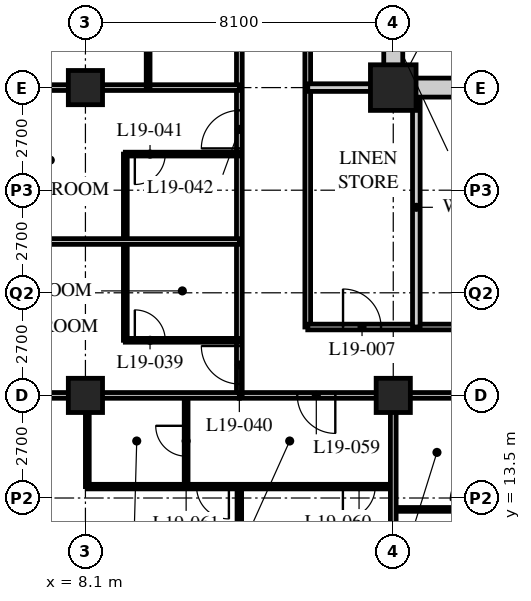
"""IFC4 building model, lengths in metres.
Left out: names, types, materials, properties, quantities, classifications, styles, units other than length and angle.
Written with IfcOpenShell. Run it as: python <this file> out.ifc"""

import sys

from ifc_helpers import new_model, si_unit, direction, frame, frame_2d, origin, origin_2d, place, context, subcontext, project, spatial, rectangle, hollow_rectangle, extrude, element, fill, save


model = new_model("IFC4")
c1 = context("Model", 3, precision=1e-05, world=origin(), true_north=direction((0.0, 1.0)))
c2 = subcontext(c1, "Body", "Model", "MODEL_VIEW")
j1 = project(units=[si_unit("LENGTHUNIT", "METRE"), si_unit("PLANEANGLEUNIT", "RADIAN")], contexts=[c1])
p1 = place(None, origin())
s1 = spatial("IfcSite", under=j1, at=p1, CompositionType="ELEMENT")
p2 = place(p1, origin())
s2 = spatial("IfcBuilding", under=s1, at=p2, CompositionType="ELEMENT")
p3 = place(p2, frame((0.0, 0.0, 77.2)))
s3 = spatial("IfcBuildingStorey", under=s2, at=p3, CompositionType="ELEMENT", Elevation=77.2)
for number, where, z_axis, x_axis in (
    (1, (8.1, 16.2, 0.0), (0.0, 0.0, 1.0), (1.0, 0.0, 0.0)),
    (2, (8.1, 24.3, 0.0), (0.0, 0.0, 1.0), (1.0, 0.0, 0.0)),
    (3, (16.2, 16.2, 0.0), (0.0, 0.0, 1.0), (1.0, 0.0, 0.0)),
):
    element("IfcColumn", number, at=place(p3, frame(where, z_axis=z_axis, x_axis=x_axis)), inside=s3, PredefinedType="COLUMN", context=c2, shape_type="SweptSolid", body=[
        extrude(hollow_rectangle(XDim=0.9, YDim=0.9, WallThickness=0.09, at=origin_2d()), origin(), (0.0, 0.0, 1.0), 3.4),
    ])
p4 = place(p3, frame((16.2, 24.3, 0.0), z_axis=(0.0, 0.0, 1.0), x_axis=(1.0, 0.0, 0.0)))
e4 = element("IfcColumn", 4, at=p4, inside=s3, PredefinedType="COLUMN", context=c2, shape_type="SweptSolid", body=[
    extrude(hollow_rectangle(XDim=1.2, YDim=1.2, WallThickness=0.12, at=origin_2d()), origin(), (0.0, 0.0, 1.0), 3.4),
])
p5 = place(p3, frame((12.15, 16.2, 0.0), z_axis=(0.0, 0.0, 1.0), x_axis=(1.0, 0.0, 0.0)))
e5 = element("IfcWall", 5, at=p5, inside=s3, PredefinedType="PARTITIONING", context=c2, shape_type="SweptSolid", body=[
    extrude(rectangle(XDim=36.45, YDim=0.15, at=frame_2d((18.225, 0.0))), origin(), (0.0, 0.0, 1.0), 2.428),
])
p6 = place(p5, frame((6.5, 0.0, 0.0)))
e6 = element("IfcOpeningElement", 6, at=p6, cuts=e5, PredefinedType="OPENING", context=c2, shape_type="SweptSolid", body=[
    extrude(rectangle(XDim=1.0, YDim=2.1, at=frame_2d((0.5, 1.05))), frame((0.0, 0.085, 0.0), z_axis=(0.0, -1.0, 0.0), x_axis=(1.0, 0.0, 0.0)), (0.0, 0.0, 1.0), 0.17),
])
p7 = place(p5, frame((8.4, 0.0, 0.0)))
e7 = element("IfcOpeningElement", 7, at=p7, cuts=e5, PredefinedType="OPENING", context=c2, shape_type="SweptSolid", body=[
    extrude(rectangle(XDim=1.0, YDim=2.1, at=frame_2d((0.5, 1.05))), frame((0.0, 0.085, 0.0), z_axis=(0.0, -1.0, 0.0), x_axis=(1.0, 0.0, 0.0)), (0.0, 0.0, 1.0), 0.17),
])
p8 = place(p5, frame((14.9, 0.0, 0.0)))
e8 = element("IfcOpeningElement", 8, at=p8, cuts=e5, PredefinedType="OPENING", context=c2, shape_type="SweptSolid", body=[
    extrude(rectangle(XDim=1.0, YDim=2.1, at=frame_2d((0.5, 1.05))), frame((0.0, 0.085, 0.0), z_axis=(0.0, -1.0, 0.0), x_axis=(1.0, 0.0, 0.0)), (0.0, 0.0, 1.0), 0.17),
])
p9 = place(p5, frame((16.5, 0.0, 0.0)))
e9 = element("IfcOpeningElement", 9, at=p9, cuts=e5, PredefinedType="OPENING", context=c2, shape_type="SweptSolid", body=[
    extrude(rectangle(XDim=1.0, YDim=2.1, at=frame_2d((0.5, 1.05))), frame((0.0, 0.085, 0.0), z_axis=(0.0, -1.0, 0.0), x_axis=(1.0, 0.0, 0.0)), (0.0, 0.0, 1.0), 0.17),
])
p10 = place(p5, frame((22.7, 0.0, 0.0)))
e10 = element("IfcOpeningElement", 10, at=p10, cuts=e5, PredefinedType="OPENING", context=c2, shape_type="SweptSolid", body=[
    extrude(rectangle(XDim=1.0, YDim=2.1, at=frame_2d((0.5, 1.05))), frame((0.0, 0.085, 0.0), z_axis=(0.0, -1.0, 0.0), x_axis=(1.0, 0.0, 0.0)), (0.0, 0.0, 1.0), 0.17),
])
p11 = place(p5, frame((24.9, 0.0, 0.0)))
e11 = element("IfcOpeningElement", 11, at=p11, cuts=e5, PredefinedType="OPENING", context=c2, shape_type="SweptSolid", body=[
    extrude(rectangle(XDim=1.0, YDim=2.1, at=frame_2d((0.5, 1.05))), frame((0.0, 0.085, 0.0), z_axis=(0.0, -1.0, 0.0), x_axis=(1.0, 0.0, 0.0)), (0.0, 0.0, 1.0), 0.17),
])
p12 = place(p5, frame((30.8, 0.0, 0.0)))
e12 = element("IfcOpeningElement", 12, at=p12, cuts=e5, PredefinedType="OPENING", context=c2, shape_type="SweptSolid", body=[
    extrude(rectangle(XDim=1.0, YDim=2.1, at=frame_2d((0.5, 1.05))), frame((0.0, 0.085, 0.0), z_axis=(0.0, -1.0, 0.0), x_axis=(1.0, 0.0, 0.0)), (0.0, 0.0, 1.0), 0.17),
])
p13 = place(p5, frame((1.525, 0.0, 0.0)))
e13 = element("IfcOpeningElement", 13, at=p13, cuts=e5, PredefinedType="OPENING", context=c2, shape_type="SweptSolid", body=[
    extrude(rectangle(XDim=1.0, YDim=2.1, at=frame_2d((0.5, 1.05))), frame((0.0, 0.085, 0.0), z_axis=(0.0, -1.0, 0.0), x_axis=(1.0, 0.0, 0.0)), (0.0, 0.0, 1.0), 0.17),
])
p14 = place(p5, frame((33.925, 0.0, 0.0)))
e14 = element("IfcOpeningElement", 14, at=p14, cuts=e5, PredefinedType="OPENING", context=c2, shape_type="SweptSolid", body=[
    extrude(rectangle(XDim=1.0, YDim=2.1, at=frame_2d((0.5, 1.05))), frame((0.0, 0.085, 0.0), z_axis=(0.0, -1.0, 0.0), x_axis=(1.0, 0.0, 0.0)), (0.0, 0.0, 1.0), 0.17),
])
p15 = place(p3, frame((12.15, 16.2, 0.0), z_axis=(0.0, 0.0, 1.0), x_axis=(0.0, 1.0, 0.0)))
e15 = element("IfcWall", 15, at=p15, inside=s3, PredefinedType="PARTITIONING", context=c2, shape_type="SweptSolid", body=[
    extrude(rectangle(XDim=26.1, YDim=0.15, at=frame_2d((13.05, 0.0))), origin(), (0.0, 0.0, 1.0), 3.19),
])
p16 = place(p15, frame((0.3, 0.0, 0.0)))
e16 = element("IfcOpeningElement", 16, at=p16, cuts=e15, PredefinedType="OPENING", context=c2, shape_type="SweptSolid", body=[
    extrude(rectangle(XDim=1.0, YDim=2.1, at=frame_2d((0.5, 1.05))), frame((0.0, 0.085, 0.0), z_axis=(0.0, -1.0, 0.0), x_axis=(1.0, 0.0, 0.0)), (0.0, 0.0, 1.0), 0.17),
])
p17 = place(p15, frame((6.5, 0.0, 0.0)))
e17 = element("IfcOpeningElement", 17, at=p17, cuts=e15, PredefinedType="OPENING", context=c2, shape_type="SweptSolid", body=[
    extrude(rectangle(XDim=1.0, YDim=2.1, at=frame_2d((0.5, 1.05))), frame((0.0, 0.085, 0.0), z_axis=(0.0, -1.0, 0.0), x_axis=(1.0, 0.0, 0.0)), (0.0, 0.0, 1.0), 0.17),
])
p18 = place(p15, frame((13.55, 0.0, 0.0)))
e18 = element("IfcOpeningElement", 18, at=p18, cuts=e15, PredefinedType="OPENING", context=c2, shape_type="SweptSolid", body=[
    extrude(rectangle(XDim=1.0, YDim=2.1, at=frame_2d((0.5, 1.05))), frame((0.0, 0.085, 0.0), z_axis=(0.0, -1.0, 0.0), x_axis=(1.0, 0.0, 0.0)), (0.0, 0.0, 1.0), 0.17),
])
p19 = place(p15, frame((21.65, 0.0, 0.0)))
e19 = element("IfcOpeningElement", 19, at=p19, cuts=e15, PredefinedType="OPENING", context=c2, shape_type="SweptSolid", body=[
    extrude(rectangle(XDim=1.0, YDim=2.1, at=frame_2d((0.5, 1.05))), frame((0.0, 0.085, 0.0), z_axis=(0.0, -1.0, 0.0), x_axis=(1.0, 0.0, 0.0)), (0.0, 0.0, 1.0), 0.17),
])
p20 = place(p3, frame((13.95, 40.5, 0.0), z_axis=(0.0, 0.0, 1.0), x_axis=(0.0, -1.0, 0.0)))
e20 = element("IfcWall", 20, at=p20, inside=s3, PredefinedType="PARTITIONING", context=c2, shape_type="SweptSolid", body=[
    extrude(rectangle(XDim=22.5, YDim=0.15, at=frame_2d((11.25, 0.0))), origin(), (0.0, 0.0, 1.0), 3.19),
])
p21 = place(p20, frame((11.65, 0.0, 0.0)))
e21 = element("IfcOpeningElement", 21, at=p21, cuts=e20, PredefinedType="OPENING", context=c2, shape_type="SweptSolid", body=[
    extrude(rectangle(XDim=1.0, YDim=2.1, at=frame_2d((0.5, 1.05))), frame((0.0, 0.085, 0.0), z_axis=(0.0, -1.0, 0.0), x_axis=(1.0, 0.0, 0.0)), (0.0, 0.0, 1.0), 0.17),
])
p22 = place(p20, frame((3.55, 0.0, 0.0)))
e22 = element("IfcOpeningElement", 22, at=p22, cuts=e20, PredefinedType="OPENING", context=c2, shape_type="SweptSolid", body=[
    extrude(rectangle(XDim=1.0, YDim=2.1, at=frame_2d((0.5, 1.05))), frame((0.0, 0.085, 0.0), z_axis=(0.0, -1.0, 0.0), x_axis=(1.0, 0.0, 0.0)), (0.0, 0.0, 1.0), 0.17),
])
p23 = place(p3, frame((13.95, 18.0, 0.0), z_axis=(0.0, 0.0, 1.0), x_axis=(1.0, 0.0, 0.0)))
e23 = element("IfcWall", 23, at=p23, inside=s3, PredefinedType="PARTITIONING", context=c2, shape_type="SweptSolid", body=[
    extrude(rectangle(XDim=13.19, YDim=0.15, at=frame_2d((6.595, 0.0))), origin(), (0.0, 0.0, 1.0), 3.19),
])
p24 = place(p23, frame((0.929, 0.0, 0.0)))
e24 = element("IfcOpeningElement", 24, at=p24, cuts=e23, PredefinedType="OPENING", context=c2, shape_type="SweptSolid", body=[
    extrude(rectangle(XDim=1.0, YDim=2.1, at=frame_2d((0.5, 1.05))), frame((0.0, 0.085, 0.0), z_axis=(0.0, -1.0, 0.0), x_axis=(1.0, 0.0, 0.0)), (0.0, 0.0, 1.0), 0.17),
])
p25 = place(p23, frame((7.529, 0.0, 0.0)))
e25 = element("IfcOpeningElement", 25, at=p25, cuts=e23, PredefinedType="OPENING", context=c2, shape_type="SweptSolid", body=[
    extrude(rectangle(XDim=1.0, YDim=2.1, at=frame_2d((0.5, 1.05))), frame((0.0, 0.085, 0.0), z_axis=(0.0, -1.0, 0.0), x_axis=(1.0, 0.0, 0.0)), (0.0, 0.0, 1.0), 0.17),
])
p26 = place(p3, frame((16.807, 18.0, 0.0), z_axis=(0.0, 0.0, 1.0), x_axis=(0.0, 1.0, 0.0)))
e26 = element("IfcWall", 26, at=p26, inside=s3, PredefinedType="SOLIDWALL", context=c2, shape_type="SweptSolid", body=[
    extrude(rectangle(XDim=6.3, YDim=0.2, at=frame_2d((3.15, 0.0))), origin(), (0.0, 0.0, 1.0), 3.19),
])
p27 = place(p3, frame((13.95, 24.3, 0.0), z_axis=(0.0, 0.0, 1.0), x_axis=(1.0, 0.0, 0.0)))
e27 = element("IfcWall", 27, at=p27, inside=s3, PredefinedType="SOLIDWALL", context=c2, shape_type="SweptSolid", body=[
    extrude(rectangle(XDim=2.25, YDim=0.2, at=frame_2d((1.125, 0.0))), origin(), (0.0, 0.0, 1.0), 2.428),
])
p28 = place(p3, frame((16.2, 13.2, 0.0), z_axis=(0.0, 0.0, 1.0), x_axis=(1.0, 0.0, 0.0)))
e28 = element("IfcWall", 28, at=p28, inside=s3, PredefinedType="PARTITIONING", context=c2, shape_type="SweptSolid", body=[
    extrude(rectangle(XDim=2.3, YDim=0.1, at=frame_2d((1.15, 0.0))), origin(), (0.0, 0.0, 1.0), 3.19),
])
p29 = place(p3, frame((9.15, 17.65, 0.0), z_axis=(0.0, 0.0, 1.0), x_axis=(0.0, 1.0, 0.0)))
e29 = element("IfcWall", 29, at=p29, inside=s3, PredefinedType="PARTITIONING", context=c2, shape_type="SweptSolid", body=[
    extrude(rectangle(XDim=4.9, YDim=0.1, at=frame_2d((2.45, 0.0))), origin(), (0.0, 0.0, 1.0), 3.19),
])
p30 = place(p3, frame((12.15, 17.65, 0.0), z_axis=(0.0, 0.0, 1.0), x_axis=(-1.0, 0.0, 0.0)))
e30 = element("IfcWall", 30, at=p30, inside=s3, PredefinedType="PARTITIONING", context=c2, shape_type="SweptSolid", body=[
    extrude(rectangle(XDim=3.0, YDim=0.1, at=frame_2d((1.5, 0.0))), origin(), (0.0, 0.0, 1.0), 3.19),
])
p31 = place(p30, frame((1.95, 0.0, 0.0)))
e31 = element("IfcOpeningElement", 31, at=p31, cuts=e30, PredefinedType="OPENING", context=c2, shape_type="SweptSolid", body=[
    extrude(rectangle(XDim=0.8, YDim=2.1, at=frame_2d((0.4, 1.05))), frame((0.0, 0.06, 0.0), z_axis=(0.0, -1.0, 0.0), x_axis=(1.0, 0.0, 0.0)), (0.0, 0.0, 1.0), 0.12),
])
p32 = place(p3, frame((12.15, 20.25, 0.0), z_axis=(0.0, 0.0, 1.0), x_axis=(-1.0, 0.0, 0.0)))
e32 = element("IfcWall", 32, at=p32, inside=s3, PredefinedType="PARTITIONING", context=c2, shape_type="SweptSolid", body=[
    extrude(rectangle(XDim=11.85, YDim=0.15, at=frame_2d((5.925, 0.0))), origin(), (0.0, 0.0, 1.0), 3.19),
])
p33 = place(p3, frame((12.15, 22.55, 0.0), z_axis=(0.0, 0.0, 1.0), x_axis=(-1.0, 0.0, 0.0)))
e33 = element("IfcWall", 33, at=p33, inside=s3, PredefinedType="PARTITIONING", context=c2, shape_type="SweptSolid", body=[
    extrude(rectangle(XDim=3.0, YDim=0.1, at=frame_2d((1.5, 0.0))), origin(), (0.0, 0.0, 1.0), 3.19),
])
p34 = place(p33, frame((1.95, 0.0, 0.0)))
e34 = element("IfcOpeningElement", 34, at=p34, cuts=e33, PredefinedType="OPENING", context=c2, shape_type="SweptSolid", body=[
    extrude(rectangle(XDim=0.8, YDim=2.1, at=frame_2d((0.4, 1.05))), frame((0.0, 0.06, 0.0), z_axis=(0.0, -1.0, 0.0), x_axis=(1.0, 0.0, 0.0)), (0.0, 0.0, 1.0), 0.12),
])
p35 = place(p3, frame((12.15, 24.3, 0.0), z_axis=(0.0, 0.0, 1.0), x_axis=(-1.0, 0.0, 0.0)))
e35 = element("IfcWall", 35, at=p35, inside=s3, PredefinedType="PARTITIONING", context=c2, shape_type="SweptSolid", body=[
    extrude(rectangle(XDim=11.85, YDim=0.15, at=frame_2d((5.925, 0.0))), origin(), (0.0, 0.0, 1.0), 2.428),
])
p36 = place(p3, frame((9.75, 24.3, 0.0), z_axis=(0.0, 0.0, 1.0), x_axis=(0.0, 1.0, 0.0)))
e36 = element("IfcWall", 36, at=p36, inside=s3, PredefinedType="PARTITIONING", context=c2, shape_type="SweptSolid", body=[
    extrude(rectangle(XDim=5.2, YDim=0.1, at=frame_2d((2.6, 0.0))), origin(), (0.0, 0.0, 1.0), 3.19),
])
p37 = place(p36, frame((1.3, 0.0, 0.0)))
e37 = element("IfcOpeningElement", 37, at=p37, cuts=e36, PredefinedType="OPENING", context=c2, shape_type="SweptSolid", body=[
    extrude(rectangle(XDim=0.8, YDim=2.1, at=frame_2d((0.4, 1.05))), frame((0.0, 0.06, 0.0), z_axis=(0.0, -1.0, 0.0), x_axis=(1.0, 0.0, 0.0)), (0.0, 0.0, 1.0), 0.12),
])
p38 = place(p36, frame((3.9, 0.0, 0.0)))
e38 = element("IfcOpeningElement", 38, at=p38, cuts=e36, PredefinedType="OPENING", context=c2, shape_type="SweptSolid", body=[
    extrude(rectangle(XDim=0.8, YDim=2.1, at=frame_2d((0.4, 1.05))), frame((0.0, 0.06, 0.0), z_axis=(0.0, -1.0, 0.0), x_axis=(1.0, 0.0, 0.0)), (0.0, 0.0, 1.0), 0.12),
])
p39 = place(p3, frame((10.75, 16.2, 0.0), z_axis=(0.0, 0.0, 1.0), x_axis=(0.0, -1.0, 0.0)))
e39 = element("IfcWall", 39, at=p39, inside=s3, PredefinedType="PARTITIONING", context=c2, shape_type="SweptSolid", body=[
    extrude(rectangle(XDim=2.4, YDim=0.1, at=frame_2d((1.2, 0.0))), origin(), (0.0, 0.0, 1.0), 3.19),
])
p40 = place(p39, frame((0.8, 0.0, 0.0)))
e40 = element("IfcOpeningElement", 40, at=p40, cuts=e39, PredefinedType="OPENING", context=c2, shape_type="SweptSolid", body=[
    extrude(rectangle(XDim=0.8, YDim=2.1, at=frame_2d((0.4, 1.05))), frame((0.0, 0.06, 0.0), z_axis=(0.0, -1.0, 0.0), x_axis=(1.0, 0.0, 0.0)), (0.0, 0.0, 1.0), 0.12),
])
p41 = place(p3, frame((8.15, 16.2, 0.0), z_axis=(0.0, 0.0, 1.0), x_axis=(0.0, -1.0, 0.0)))
e41 = element("IfcWall", 41, at=p41, inside=s3, PredefinedType="PARTITIONING", context=c2, shape_type="SweptSolid", body=[
    extrude(rectangle(XDim=2.4, YDim=0.1, at=frame_2d((1.2, 0.0))), origin(), (0.0, 0.0, 1.0), 2.428),
])
p42 = place(p3, frame((8.15, 13.8, 0.0), z_axis=(0.0, 0.0, 1.0), x_axis=(1.0, 0.0, 0.0)))
e42 = element("IfcWall", 42, at=p42, inside=s3, PredefinedType="PARTITIONING", context=c2, shape_type="SweptSolid", body=[
    extrude(rectangle(XDim=8.05, YDim=0.12, at=frame_2d((4.025, 0.0))), origin(), (0.0, 0.0, 1.0), 3.19),
])
p43 = place(p42, frame((6.725, 0.0, 0.0)))
e43 = element("IfcOpeningElement", 43, at=p43, cuts=e42, PredefinedType="OPENING", context=c2, shape_type="SweptSolid", body=[
    extrude(rectangle(XDim=0.85, YDim=2.1, at=frame_2d((0.425, 1.05))), frame((0.0, 0.07, 0.0), z_axis=(0.0, -1.0, 0.0), x_axis=(1.0, 0.0, 0.0)), (0.0, 0.0, 1.0), 0.14),
])
p44 = place(p42, frame((2.875, 0.0, 0.0)))
e44 = element("IfcOpeningElement", 44, at=p44, cuts=e42, PredefinedType="OPENING", context=c2, shape_type="SweptSolid", body=[
    extrude(rectangle(XDim=0.85, YDim=2.1, at=frame_2d((0.425, 1.05))), frame((0.0, 0.07, 0.0), z_axis=(0.0, -1.0, 0.0), x_axis=(1.0, 0.0, 0.0)), (0.0, 0.0, 1.0), 0.14),
])
p45 = place(p3, frame((12.15, 13.8, 0.0), z_axis=(0.0, 0.0, 1.0), x_axis=(0.0, -1.0, 0.0)))
e45 = element("IfcWall", 45, at=p45, inside=s3, PredefinedType="PARTITIONING", context=c2, shape_type="SweptSolid", body=[
    extrude(rectangle(XDim=13.5, YDim=0.12, at=frame_2d((6.75, 0.0))), origin(), (0.0, 0.0, 1.0), 3.19),
])
p46 = place(p3, frame((0.3, 16.2, 0.0), z_axis=(0.0, 0.0, 1.0), x_axis=(1.0, 0.0, 0.0)))
e46 = element("IfcWall", 46, at=p46, inside=s3, PredefinedType="PARTITIONING", context=c2, shape_type="SweptSolid", body=[
    extrude(rectangle(XDim=11.85, YDim=0.15, at=frame_2d((5.925, 0.0))), origin(), (0.0, 0.0, 1.0), 2.428),
])
p47 = place(p3, frame((16.2, 16.2, 0.0), z_axis=(0.0, 0.0, 1.0), x_axis=(0.0, -1.0, 0.0)))
e47 = element("IfcWall", 47, at=p47, inside=s3, PredefinedType="PARTITIONING", context=c2, shape_type="SweptSolid", body=[
    extrude(rectangle(XDim=15.9, YDim=0.15, at=frame_2d((7.95, 0.0))), origin(), (0.0, 0.0, 1.0), 2.428),
])
p48 = place(p3, frame((15.95, 24.3, 0.0), z_axis=(0.0, 0.0, 1.0), x_axis=(1.0, 0.0, 0.0)))
e48 = element("IfcWall", 48, at=p48, inside=s3, PredefinedType="SOLIDWALL", context=c2, shape_type="SweptSolid", body=[
    extrude(rectangle(XDim=24.8, YDim=0.5, at=frame_2d((12.4, 0.0))), origin(), (0.0, 0.0, 1.0), 2.428),
])
p49 = place(p48, frame((11.5, 0.0, 0.0)))
e49 = element("IfcOpeningElement", 49, at=p49, cuts=e48, PredefinedType="OPENING", context=c2, shape_type="SweptSolid", body=[
    extrude(rectangle(XDim=1.8, YDim=2.4, at=frame_2d((0.9, 1.2))), frame((0.0, 0.26, 0.0), z_axis=(0.0, -1.0, 0.0), x_axis=(1.0, 0.0, 0.0)), (0.0, 0.0, 1.0), 0.52),
])
p50 = place(p3, frame((16.2, 24.55, 0.0), z_axis=(0.0, 0.0, 1.0), x_axis=(0.0, 1.0, 0.0)))
e50 = element("IfcWall", 50, at=p50, inside=s3, PredefinedType="SOLIDWALL", context=c2, shape_type="SweptSolid", body=[
    extrude(rectangle(XDim=15.7, YDim=0.5, at=frame_2d((7.85, 0.0))), origin(), (0.0, 0.0, 1.0), 2.428),
])
p51 = place(p24, origin())
e51 = element("IfcDoor", 51, at=p51, inside=s3, OperationType="SINGLE_SWING_LEFT", PredefinedType="DOOR", context=c2, shape_type="SweptSolid", body=[
    extrude(rectangle(XDim=1.0, YDim=2.1, at=frame_2d((0.5, 1.05))), frame((0.0, 0.025, 0.0), z_axis=(0.0, -1.0, 0.0), x_axis=(1.0, 0.0, 0.0)), (0.0, 0.0, 1.0), 0.05),
])
fill(e24, e51)
p52 = place(p31, origin())
e52 = element("IfcDoor", 52, at=p52, inside=s3, OperationType="SINGLE_SWING_LEFT", PredefinedType="DOOR", context=c2, shape_type="SweptSolid", body=[
    extrude(rectangle(XDim=0.8, YDim=2.1, at=frame_2d((0.4, 1.05))), frame((0.0, 0.025, 0.0), z_axis=(0.0, -1.0, 0.0), x_axis=(1.0, 0.0, 0.0)), (0.0, 0.0, 1.0), 0.05),
])
fill(e31, e52)
p53 = place(p16, origin())
e53 = element("IfcDoor", 53, at=p53, inside=s3, OperationType="SINGLE_SWING_RIGHT", PredefinedType="DOOR", context=c2, shape_type="SweptSolid", body=[
    extrude(rectangle(XDim=1.0, YDim=2.1, at=frame_2d((0.5, 1.05))), frame((0.0, 0.025, 0.0), z_axis=(0.0, -1.0, 0.0), x_axis=(1.0, 0.0, 0.0)), (0.0, 0.0, 1.0), 0.05),
])
fill(e16, e53)
p54 = place(p34, origin())
e54 = element("IfcDoor", 54, at=p54, inside=s3, OperationType="SINGLE_SWING_RIGHT", PredefinedType="DOOR", context=c2, shape_type="SweptSolid", body=[
    extrude(rectangle(XDim=0.8, YDim=2.1, at=frame_2d((0.4, 1.05))), frame((0.0, 0.025, 0.0), z_axis=(0.0, -1.0, 0.0), x_axis=(1.0, 0.0, 0.0)), (0.0, 0.0, 1.0), 0.05),
])
fill(e34, e54)
p55 = place(p17, origin())
e55 = element("IfcDoor", 55, at=p55, inside=s3, OperationType="SINGLE_SWING_LEFT", PredefinedType="DOOR", context=c2, shape_type="SweptSolid", body=[
    extrude(rectangle(XDim=1.0, YDim=2.1, at=frame_2d((0.5, 1.05))), frame((0.0, 0.025, 0.0), z_axis=(0.0, -1.0, 0.0), x_axis=(1.0, 0.0, 0.0)), (0.0, 0.0, 1.0), 0.05),
])
fill(e17, e55)
p56 = place(p13, origin())
e56 = element("IfcDoor", 56, at=p56, inside=s3, OperationType="SINGLE_SWING_LEFT", PredefinedType="DOOR", context=c2, shape_type="SweptSolid", body=[
    extrude(rectangle(XDim=1.0, YDim=2.1, at=frame_2d((0.5, 1.05))), frame((0.0, 0.025, 0.0), z_axis=(0.0, -1.0, 0.0), x_axis=(1.0, 0.0, 0.0)), (0.0, 0.0, 1.0), 0.05),
])
fill(e13, e56)
p57 = place(p43, origin())
e57 = element("IfcDoor", 57, at=p57, inside=s3, OperationType="SINGLE_SWING_RIGHT", PredefinedType="DOOR", context=c2, shape_type="SweptSolid", body=[
    extrude(rectangle(XDim=0.85, YDim=2.1, at=frame_2d((0.425, 1.05))), frame((0.0, 0.025, 0.0), z_axis=(0.0, -1.0, 0.0), x_axis=(1.0, 0.0, 0.0)), (0.0, 0.0, 1.0), 0.05),
])
fill(e43, e57)
p58 = place(p40, origin())
e58 = element("IfcDoor", 58, at=p58, inside=s3, OperationType="SINGLE_SWING_RIGHT", PredefinedType="DOOR", context=c2, shape_type="SweptSolid", body=[
    extrude(rectangle(XDim=0.8, YDim=2.1, at=frame_2d((0.4, 1.05))), frame((0.0, 0.025, 0.0), z_axis=(0.0, -1.0, 0.0), x_axis=(1.0, 0.0, 0.0)), (0.0, 0.0, 1.0), 0.05),
])
fill(e40, e58)
p59 = place(p44, origin())
e59 = element("IfcDoor", 59, at=p59, inside=s3, OperationType="SINGLE_SWING_LEFT", PredefinedType="DOOR", context=c2, shape_type="SweptSolid", body=[
    extrude(rectangle(XDim=0.85, YDim=2.1, at=frame_2d((0.425, 1.05))), frame((0.0, 0.025, 0.0), z_axis=(0.0, -1.0, 0.0), x_axis=(1.0, 0.0, 0.0)), (0.0, 0.0, 1.0), 0.05),
])
fill(e44, e59)
save(model, sys.argv[1])
